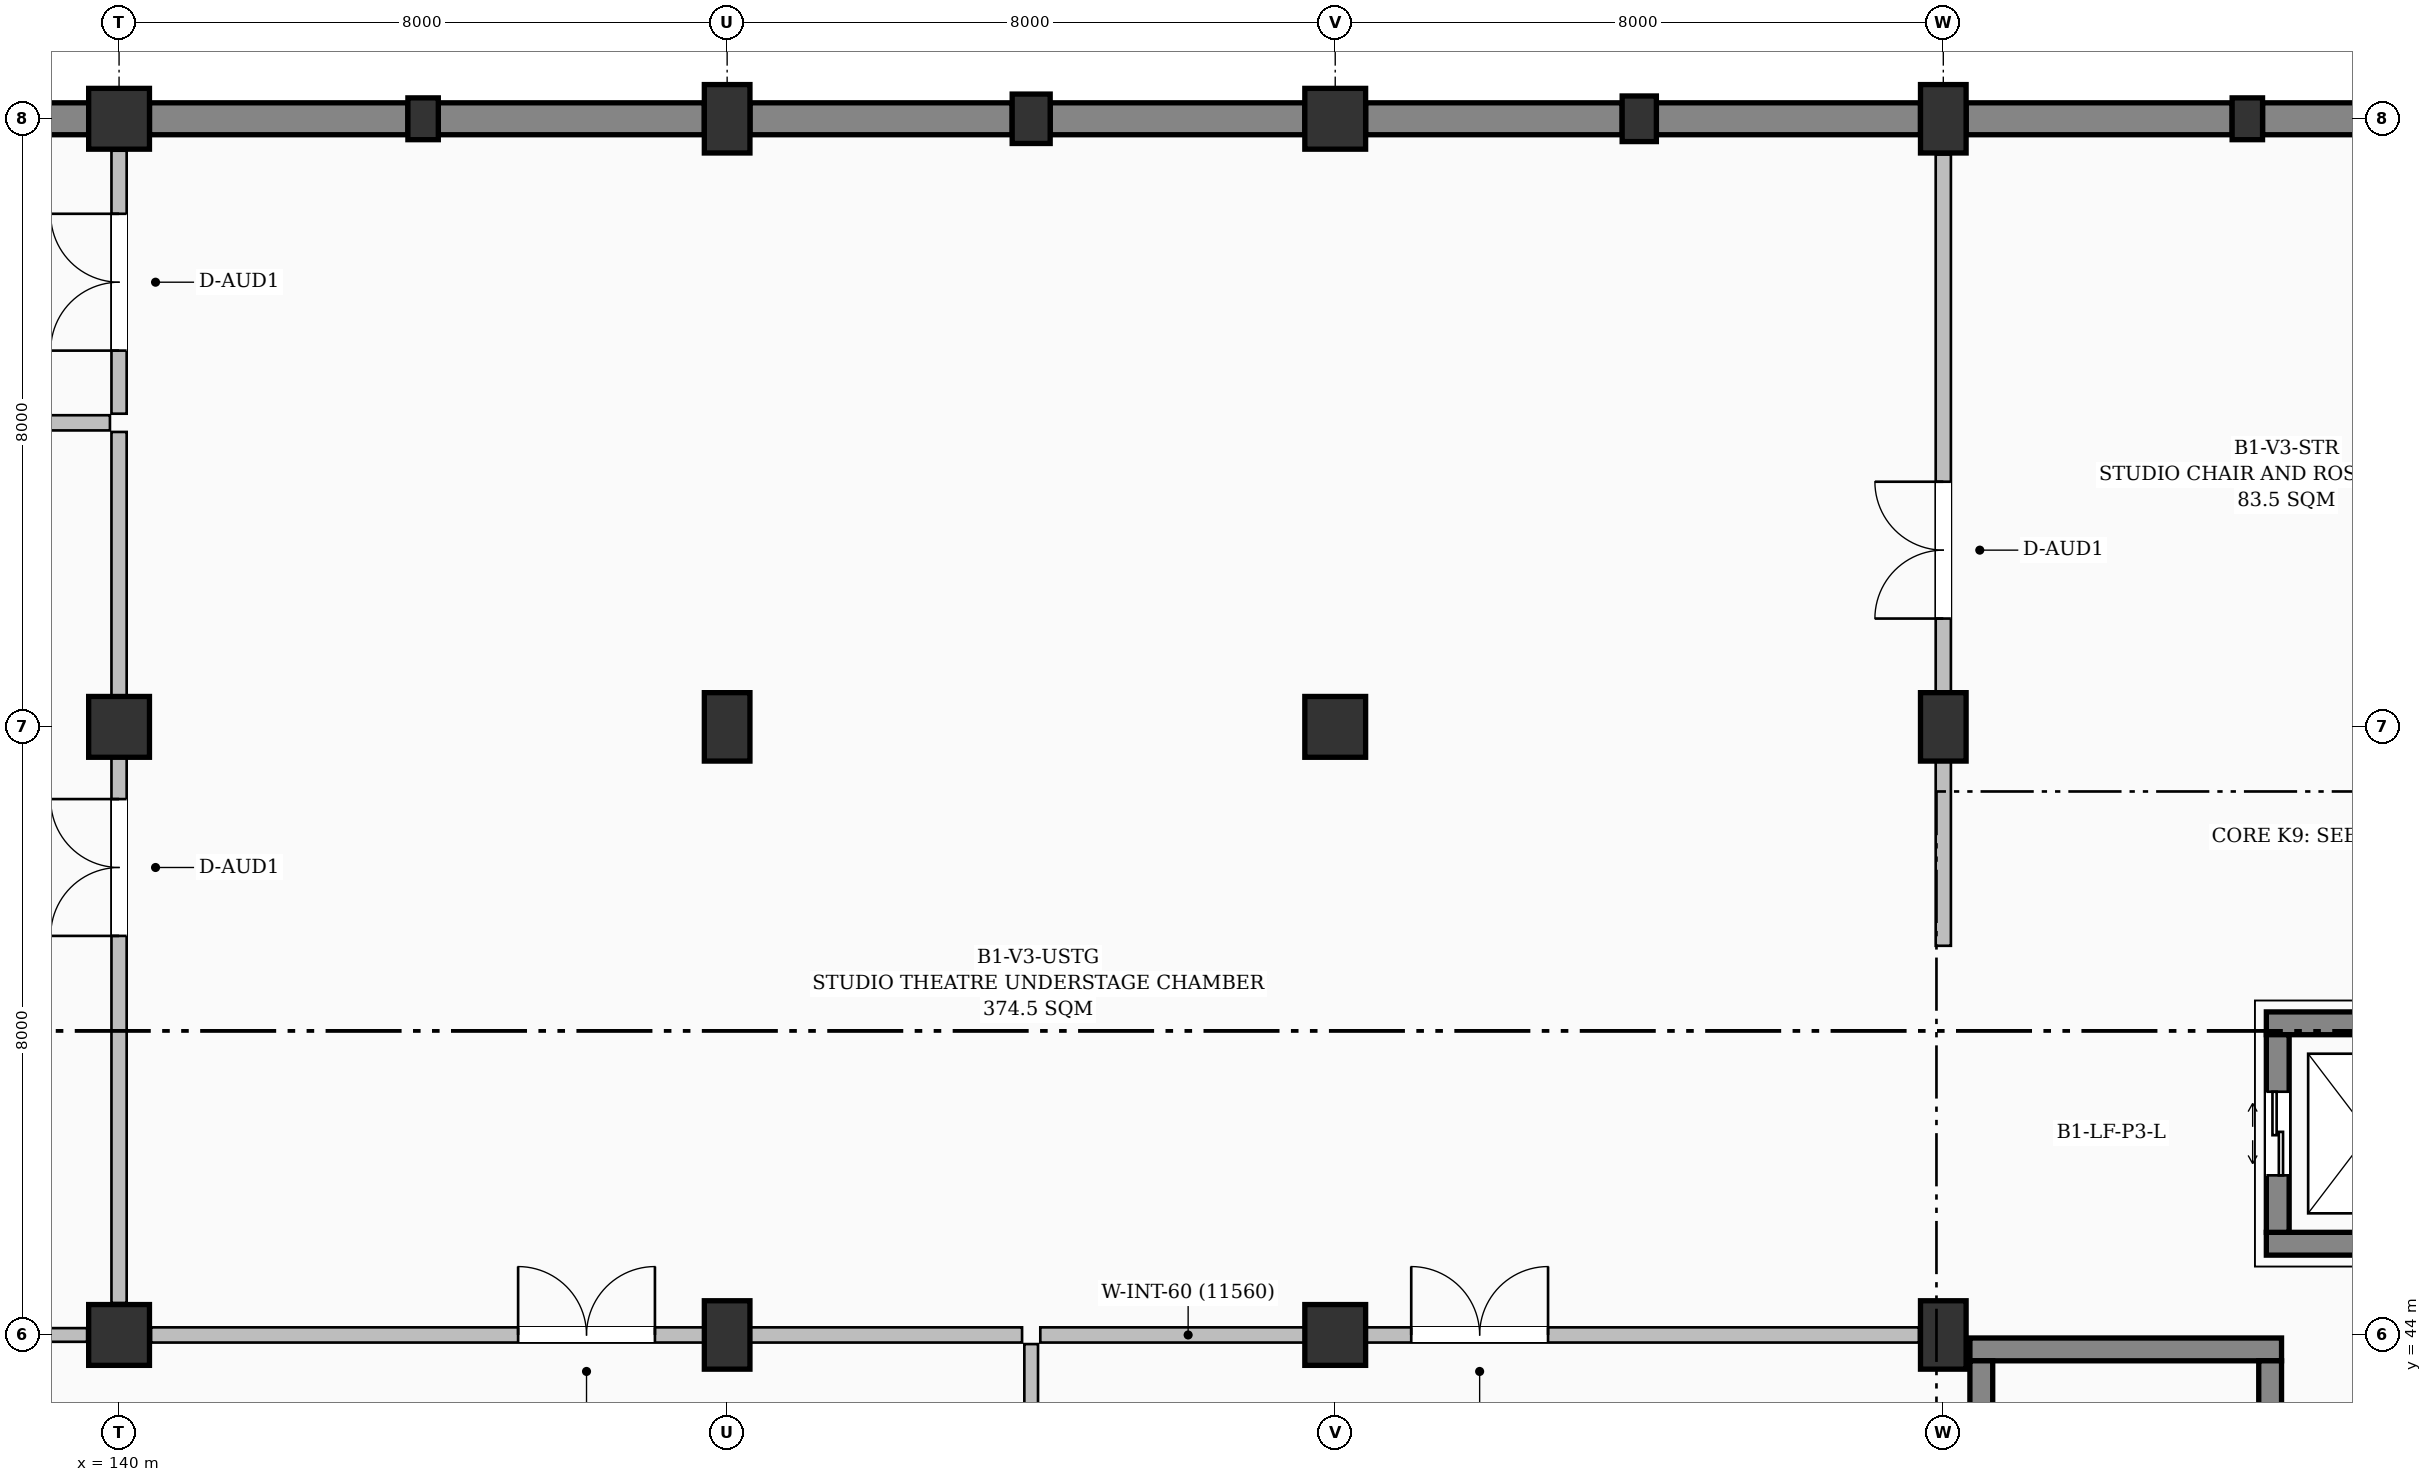
"""IFC4 building model, lengths in metres.
Left out: names, types, materials, properties, quantities, classifications, styles, units other than length and angle.
Written with IfcOpenShell. Run it as: python <this file> out.ifc"""

import sys

from ifc_helpers import new_model, si_unit, direction, frame, frame_2d, origin, origin_2d, place, context, subcontext, project, spatial, rectangle, extrude, element, fill, save


model = new_model("IFC4")
c1 = context("Model", 3, precision=1e-05, world=origin(), true_north=direction((0.0, 1.0)))
c2 = subcontext(c1, "Body", "Model", "MODEL_VIEW")
j1 = project(units=[si_unit("LENGTHUNIT", "METRE"), si_unit("PLANEANGLEUNIT", "RADIAN")], contexts=[c1])
p1 = place(None, origin())
s1 = spatial("IfcSite", under=j1, at=p1, CompositionType="ELEMENT")
p2 = place(p1, origin())
s2 = spatial("IfcBuilding", under=s1, at=p2, CompositionType="ELEMENT")
p3 = place(p2, frame((0.0, 0.0, -4.8)))
s3 = spatial("IfcBuildingStorey", under=s2, at=p3, CompositionType="ELEMENT", Elevation=-4.8)
for number, where, z_axis, x_axis in (
    (1, (140.0, 44.0, -0.38), (0.0, 0.0, 1.0), (1.0, 0.0, 0.0)),
    (2, (140.0, 52.0, -0.38), (0.0, 0.0, 1.0), (1.0, 0.0, 0.0)),
    (3, (140.0, 60.0, -0.38), (0.0, 0.0, 1.0), (1.0, 0.0, 0.0)),
):
    element("IfcColumn", number, at=place(p3, frame(where, z_axis=z_axis, x_axis=x_axis)), inside=s3, PredefinedType="COLUMN", context=c2, shape_type="SweptSolid", body=[
        extrude(rectangle(XDim=0.8, YDim=0.8, at=origin_2d()), origin(), (0.0, 0.0, 1.0), 5.18),
    ])
p4 = place(p3, frame((144.0, 60.0, -0.38), z_axis=(0.0, 0.0, 1.0), x_axis=(1.0, 0.0, 0.0)))
e4 = element("IfcColumn", 4, at=p4, inside=s3, PredefinedType="PILASTER", context=c2, shape_type="SweptSolid", body=[
    extrude(rectangle(XDim=0.4, YDim=0.55, at=origin_2d()), origin(), (0.0, 0.0, 1.0), 5.18),
])
for number, where, z_axis, x_axis in (
    (5, (148.0, 44.0, -0.38), (0.0, 0.0, 1.0), (1.0, 0.0, 0.0)),
    (6, (148.0, 52.0, -0.38), (0.0, 0.0, 1.0), (1.0, 0.0, 0.0)),
    (7, (148.0, 60.0, -0.38), (0.0, 0.0, 1.0), (1.0, 0.0, 0.0)),
):
    element("IfcColumn", number, at=place(p3, frame(where, z_axis=z_axis, x_axis=x_axis)), inside=s3, PredefinedType="COLUMN", context=c2, shape_type="SweptSolid", body=[
        extrude(rectangle(XDim=0.6, YDim=0.9, at=origin_2d()), origin(), (0.0, 0.0, 1.0), 5.18),
    ])
p5 = place(p3, frame((152.0, 60.0, -0.38), z_axis=(0.0, 0.0, 1.0), x_axis=(1.0, 0.0, 0.0)))
e8 = element("IfcColumn", 8, at=p5, inside=s3, PredefinedType="PILASTER", context=c2, shape_type="SweptSolid", body=[
    extrude(rectangle(XDim=0.5, YDim=0.65, at=origin_2d()), origin(), (0.0, 0.0, 1.0), 5.18),
])
for number, where, z_axis, x_axis in (
    (9, (156.0, 44.0, -0.38), (0.0, 0.0, 1.0), (1.0, 0.0, 0.0)),
    (10, (156.0, 52.0, -0.38), (0.0, 0.0, 1.0), (1.0, 0.0, 0.0)),
    (11, (156.0, 60.0, -0.38), (0.0, 0.0, 1.0), (1.0, 0.0, 0.0)),
):
    element("IfcColumn", number, at=place(p3, frame(where, z_axis=z_axis, x_axis=x_axis)), inside=s3, PredefinedType="COLUMN", context=c2, shape_type="SweptSolid", body=[
        extrude(rectangle(XDim=0.8, YDim=0.8, at=origin_2d()), origin(), (0.0, 0.0, 1.0), 5.18),
    ])
p6 = place(p3, frame((160.0, 60.0, -0.38), z_axis=(0.0, 0.0, 1.0), x_axis=(1.0, 0.0, 0.0)))
e12 = element("IfcColumn", 12, at=p6, inside=s3, PredefinedType="PILASTER", context=c2, shape_type="SweptSolid", body=[
    extrude(rectangle(XDim=0.45, YDim=0.6, at=origin_2d()), origin(), (0.0, 0.0, 1.0), 5.18),
])
for number, where, z_axis, x_axis in (
    (13, (164.0, 44.0, -0.38), (0.0, 0.0, 1.0), (1.0, 0.0, 0.0)),
    (14, (164.0, 52.0, -0.38), (0.0, 0.0, 1.0), (1.0, 0.0, 0.0)),
    (15, (164.0, 60.0, -0.38), (0.0, 0.0, 1.0), (1.0, 0.0, 0.0)),
):
    element("IfcColumn", number, at=place(p3, frame(where, z_axis=z_axis, x_axis=x_axis)), inside=s3, PredefinedType="COLUMN", context=c2, shape_type="SweptSolid", body=[
        extrude(rectangle(XDim=0.6, YDim=0.9, at=origin_2d()), origin(), (0.0, 0.0, 1.0), 5.18),
    ])
p7 = place(p3, frame((168.0, 60.0, -0.38), z_axis=(0.0, 0.0, 1.0), x_axis=(1.0, 0.0, 0.0)))
e16 = element("IfcColumn", 16, at=p7, inside=s3, PredefinedType="PILASTER", context=c2, shape_type="SweptSolid", body=[
    extrude(rectangle(XDim=0.4, YDim=0.55, at=origin_2d()), origin(), (0.0, 0.0, 1.0), 5.18),
])
p8 = place(p3, frame((136.225, 60.0, 0.0), z_axis=(0.0, 0.0, 1.0), x_axis=(1.0, 0.0, 0.0)))
e17 = element("IfcWall", 17, at=p8, inside=s3, PredefinedType="USERDEFINED", context=c2, shape_type="SweptSolid", body=[
    extrude(rectangle(XDim=3.375, YDim=0.42, at=frame_2d((1.688, 0.0))), origin(), (0.0, 0.0, 1.0), 3.85),
])
p9 = place(p3, frame((140.4, 60.0, 0.0), z_axis=(0.0, 0.0, 1.0), x_axis=(1.0, 0.0, 0.0)))
e18 = element("IfcWall", 18, at=p9, inside=s3, PredefinedType="USERDEFINED", context=c2, shape_type="SweptSolid", body=[
    extrude(rectangle(XDim=3.4, YDim=0.42, at=frame_2d((1.7, 0.0))), origin(), (0.0, 0.0, 1.0), 3.85),
])
p10 = place(p3, frame((144.2, 60.0, 0.0), z_axis=(0.0, 0.0, 1.0), x_axis=(1.0, 0.0, 0.0)))
e19 = element("IfcWall", 19, at=p10, inside=s3, PredefinedType="USERDEFINED", context=c2, shape_type="SweptSolid", body=[
    extrude(rectangle(XDim=3.5, YDim=0.42, at=frame_2d((1.75, 0.0))), origin(), (0.0, 0.0, 1.0), 3.85),
])
p11 = place(p3, frame((148.3, 60.0, 0.0), z_axis=(0.0, 0.0, 1.0), x_axis=(1.0, 0.0, 0.0)))
e20 = element("IfcWall", 20, at=p11, inside=s3, PredefinedType="USERDEFINED", context=c2, shape_type="SweptSolid", body=[
    extrude(rectangle(XDim=3.45, YDim=0.42, at=frame_2d((1.725, 0.0))), origin(), (0.0, 0.0, 1.0), 3.85),
])
p12 = place(p3, frame((152.25, 60.0, 0.0), z_axis=(0.0, 0.0, 1.0), x_axis=(1.0, 0.0, 0.0)))
e21 = element("IfcWall", 21, at=p12, inside=s3, PredefinedType="USERDEFINED", context=c2, shape_type="SweptSolid", body=[
    extrude(rectangle(XDim=3.35, YDim=0.42, at=frame_2d((1.675, 0.0))), origin(), (0.0, 0.0, 1.0), 3.85),
])
p13 = place(p3, frame((156.4, 60.0, 0.0), z_axis=(0.0, 0.0, 1.0), x_axis=(1.0, 0.0, 0.0)))
e22 = element("IfcWall", 22, at=p13, inside=s3, PredefinedType="USERDEFINED", context=c2, shape_type="SweptSolid", body=[
    extrude(rectangle(XDim=3.375, YDim=0.42, at=frame_2d((1.688, 0.0))), origin(), (0.0, 0.0, 1.0), 3.85),
])
p14 = place(p3, frame((160.225, 60.0, 0.0), z_axis=(0.0, 0.0, 1.0), x_axis=(1.0, 0.0, 0.0)))
e23 = element("IfcWall", 23, at=p14, inside=s3, PredefinedType="USERDEFINED", context=c2, shape_type="SweptSolid", body=[
    extrude(rectangle(XDim=3.475, YDim=0.42, at=frame_2d((1.737, 0.0))), origin(), (0.0, 0.0, 1.0), 3.85),
])
p15 = place(p3, frame((164.3, 60.0, 0.0), z_axis=(0.0, 0.0, 1.0), x_axis=(1.0, 0.0, 0.0)))
e24 = element("IfcWall", 24, at=p15, inside=s3, PredefinedType="USERDEFINED", context=c2, shape_type="SweptSolid", body=[
    extrude(rectangle(XDim=3.5, YDim=0.42, at=frame_2d((1.75, 0.0))), origin(), (0.0, 0.0, 1.0), 3.85),
])
p16 = place(p3, frame((168.2, 60.0, 0.0), z_axis=(0.0, 0.0, 1.0), x_axis=(1.0, 0.0, 0.0)))
e25 = element("IfcWall", 25, at=p16, inside=s3, PredefinedType="USERDEFINED", context=c2, shape_type="SweptSolid", body=[
    extrude(rectangle(XDim=3.45, YDim=0.42, at=frame_2d((1.725, 0.0))), origin(), (0.0, 0.0, 1.0), 3.85),
])
p17 = place(p3, frame((168.45, 43.81, -0.38), z_axis=(0.0, 0.0, 1.0), x_axis=(-1.0, 0.0, 0.0)))
e26 = element("IfcWall", 26, at=p17, inside=s3, PredefinedType="SHEAR", context=c2, shape_type="SweptSolid", body=[
    extrude(rectangle(XDim=4.1, YDim=0.3, at=frame_2d((2.05, 0.0))), origin(), (0.0, 0.0, 1.0), 4.88),
])
p18 = place(p3, frame((164.5, 43.66, -0.38), z_axis=(0.0, 0.0, 1.0), x_axis=(0.0, -1.0, 0.0)))
e27 = element("IfcWall", 27, at=p18, inside=s3, PredefinedType="SHEAR", context=c2, shape_type="SweptSolid", body=[
    extrude(rectangle(XDim=7.32, YDim=0.3, at=frame_2d((3.66, 0.0))), origin(), (0.0, 0.0, 1.0), 4.88),
])
p19 = place(p18, frame((5.77, 0.0, 0.38)))
e28 = element("IfcOpeningElement", 28, at=p19, cuts=e27, PredefinedType="OPENING", context=c2, shape_type="SweptSolid", body=[
    extrude(rectangle(XDim=1.2, YDim=2.15, at=frame_2d((0.6, 1.075))), frame((0.0, 0.16, 0.0), z_axis=(0.0, -1.0, 0.0), x_axis=(1.0, 0.0, 0.0)), (0.0, 0.0, 1.0), 0.32),
])
p20 = place(p3, frame((168.3, 43.66, -0.38), z_axis=(0.0, 0.0, 1.0), x_axis=(0.0, -1.0, 0.0)))
e29 = element("IfcWall", 29, at=p20, inside=s3, PredefinedType="SHEAR", context=c2, shape_type="SweptSolid", body=[
    extrude(rectangle(XDim=7.32, YDim=0.3, at=frame_2d((3.66, 0.0))), origin(), (0.0, 0.0, 1.0), 4.88),
])
for number, where, z_axis, x_axis in (
    (30, (168.25, 45.2, -1.2), (0.0, 0.0, 1.0), (1.0, 0.0, 0.0)),
    (31, (170.95, 48.1, -1.2), (0.0, 0.0, 1.0), (-1.0, 0.0, 0.0)),
):
    element("IfcWall", number, at=place(p3, frame(where, z_axis=z_axis, x_axis=x_axis)), inside=s3, PredefinedType="SHEAR", context=c2, shape_type="SweptSolid", body=[
        extrude(rectangle(XDim=2.7, YDim=0.3, at=frame_2d((1.35, 0.0))), origin(), (0.0, 0.0, 1.0), 5.7),
    ])
p21 = place(p3, frame((168.4, 45.35, -1.2), z_axis=(0.0, 0.0, 1.0), x_axis=(0.0, 1.0, 0.0)))
e32 = element("IfcWall", 32, at=p21, inside=s3, PredefinedType="SHEAR", context=c2, shape_type="SweptSolid", body=[
    extrude(rectangle(XDim=2.6, YDim=0.3, at=frame_2d((1.3, 0.0))), origin(), (0.0, 0.0, 1.0), 5.7),
])
p22 = place(p21, frame((0.75, 0.0, 1.2)))
e33 = element("IfcOpeningElement", 33, at=p22, cuts=e32, PredefinedType="OPENING", context=c2, shape_type="SweptSolid", body=[
    extrude(rectangle(XDim=1.1, YDim=2.15, at=frame_2d((0.55, 1.075))), frame((0.0, 0.16, 0.0), z_axis=(0.0, -1.0, 0.0), x_axis=(1.0, 0.0, 0.0)), (0.0, 0.0, 1.0), 0.32),
])
p23 = place(p3, frame((140.42, 44.0, 0.0), z_axis=(0.0, 0.0, 1.0), x_axis=(1.0, 0.0, 0.0)))
e34 = element("IfcWall", 34, at=p23, inside=s3, PredefinedType="PARTITIONING", context=c2, shape_type="SweptSolid", body=[
    extrude(rectangle(XDim=11.46, YDim=0.2, at=frame_2d((5.73, 0.0))), origin(), (0.0, 0.0, 1.0), 3.635),
])
p24 = place(p23, frame((4.83, 0.0, 0.0)))
e35 = element("IfcOpeningElement", 35, at=p24, cuts=e34, PredefinedType="OPENING", context=c2, shape_type="SweptSolid", body=[
    extrude(rectangle(XDim=1.8, YDim=2.35, at=frame_2d((0.9, 1.175))), frame((0.0, 0.11, 0.0), z_axis=(0.0, -1.0, 0.0), x_axis=(1.0, 0.0, 0.0)), (0.0, 0.0, 1.0), 0.22),
])
p25 = place(p3, frame((152.12, 44.0, 0.0), z_axis=(0.0, 0.0, 1.0), x_axis=(1.0, 0.0, 0.0)))
e36 = element("IfcWall", 36, at=p25, inside=s3, PredefinedType="PARTITIONING", context=c2, shape_type="SweptSolid", body=[
    extrude(rectangle(XDim=11.56, YDim=0.2, at=frame_2d((5.78, 0.0))), origin(), (0.0, 0.0, 1.0), 3.685),
])
p26 = place(p25, frame((4.88, 0.0, 0.0)))
e37 = element("IfcOpeningElement", 37, at=p26, cuts=e36, PredefinedType="OPENING", context=c2, shape_type="SweptSolid", body=[
    extrude(rectangle(XDim=1.8, YDim=2.35, at=frame_2d((0.9, 1.175))), frame((0.0, 0.11, 0.0), z_axis=(0.0, -1.0, 0.0), x_axis=(1.0, 0.0, 0.0)), (0.0, 0.0, 1.0), 0.22),
])
p27 = place(p3, frame((140.0, 44.42, 0.0), z_axis=(0.0, 0.0, 1.0), x_axis=(0.0, 1.0, 0.0)))
e38 = element("IfcWall", 38, at=p27, inside=s3, PredefinedType="PARTITIONING", context=c2, shape_type="SweptSolid", body=[
    extrude(rectangle(XDim=11.46, YDim=0.2, at=frame_2d((5.73, 0.0))), origin(), (0.0, 0.0, 1.0), 3.885),
])
p28 = place(p27, frame((4.83, 0.0, 0.0)))
e39 = element("IfcOpeningElement", 39, at=p28, cuts=e38, PredefinedType="OPENING", context=c2, shape_type="SweptSolid", body=[
    extrude(rectangle(XDim=1.8, YDim=2.35, at=frame_2d((0.9, 1.175))), frame((0.0, 0.11, 0.0), z_axis=(0.0, -1.0, 0.0), x_axis=(1.0, 0.0, 0.0)), (0.0, 0.0, 1.0), 0.22),
])
p29 = place(p3, frame((140.0, 56.12, 0.0), z_axis=(0.0, 0.0, 1.0), x_axis=(0.0, 1.0, 0.0)))
e40 = element("IfcWall", 40, at=p29, inside=s3, PredefinedType="PARTITIONING", context=c2, shape_type="SweptSolid", body=[
    extrude(rectangle(XDim=3.46, YDim=0.2, at=frame_2d((1.73, 0.0))), origin(), (0.0, 0.0, 1.0), 3.885),
])
p30 = place(p29, frame((0.83, 0.0, 0.0)))
e41 = element("IfcOpeningElement", 41, at=p30, cuts=e40, PredefinedType="OPENING", context=c2, shape_type="SweptSolid", body=[
    extrude(rectangle(XDim=1.8, YDim=2.35, at=frame_2d((0.9, 1.175))), frame((0.0, 0.11, 0.0), z_axis=(0.0, -1.0, 0.0), x_axis=(1.0, 0.0, 0.0)), (0.0, 0.0, 1.0), 0.22),
])
p31 = place(p3, frame((164.0, 49.12, 0.0), z_axis=(0.0, 0.0, 1.0), x_axis=(0.0, 1.0, 0.0)))
e42 = element("IfcWall", 42, at=p31, inside=s3, PredefinedType="PARTITIONING", context=c2, shape_type="SweptSolid", body=[
    extrude(rectangle(XDim=10.41, YDim=0.2, at=frame_2d((5.205, 0.0))), origin(), (0.0, 0.0, 1.0), 3.885),
])
p32 = place(p31, frame((4.305, 0.0, 0.0)))
e43 = element("IfcOpeningElement", 43, at=p32, cuts=e42, PredefinedType="OPENING", context=c2, shape_type="SweptSolid", body=[
    extrude(rectangle(XDim=1.8, YDim=2.35, at=frame_2d((0.9, 1.175))), frame((0.0, 0.11, 0.0), z_axis=(0.0, -1.0, 0.0), x_axis=(1.0, 0.0, 0.0)), (0.0, 0.0, 1.0), 0.22),
])
p33 = place(p3, frame((152.0, 36.345, 0.0), z_axis=(0.0, 0.0, 1.0), x_axis=(0.0, 1.0, 0.0)))
e44 = element("IfcWall", 44, at=p33, inside=s3, PredefinedType="PARTITIONING", context=c2, shape_type="SweptSolid", body=[
    extrude(rectangle(XDim=7.535, YDim=0.18, at=frame_2d((3.768, 0.0))), origin(), (0.0, 0.0, 1.0), 4.5),
])
p34 = place(p33, frame((3.093, 0.0, 0.0)))
e45 = element("IfcOpeningElement", 45, at=p34, cuts=e44, PredefinedType="OPENING", context=c2, shape_type="SweptSolid", body=[
    extrude(rectangle(XDim=1.35, YDim=2.2, at=frame_2d((0.675, 1.1))), frame((0.0, 0.1, 0.0), z_axis=(0.0, -1.0, 0.0), x_axis=(1.0, 0.0, 0.0)), (0.0, 0.0, 1.0), 0.2),
])
p35 = place(p3, frame((132.345, 44.0, 0.0), z_axis=(0.0, 0.0, 1.0), x_axis=(1.0, 0.0, 0.0)))
e46 = element("IfcWall", 46, at=p35, inside=s3, PredefinedType="PARTITIONING", context=c2, shape_type="SweptSolid", body=[
    extrude(rectangle(XDim=7.235, YDim=0.18, at=frame_2d((3.618, 0.0))), origin(), (0.0, 0.0, 1.0), 3.735),
])
p36 = place(p3, frame((136.12, 56.0, 0.0), z_axis=(0.0, 0.0, 1.0), x_axis=(1.0, 0.0, 0.0)))
e47 = element("IfcWall", 47, at=p36, inside=s3, PredefinedType="PARTITIONING", context=c2, shape_type="SweptSolid", body=[
    extrude(rectangle(XDim=3.76, YDim=0.2, at=frame_2d((1.88, 0.0))), origin(), (0.0, 0.0, 1.0), 4.5),
])
p37 = place(p22, origin())
e48 = element("IfcDoor", 48, at=p37, inside=s3, OperationType="DOUBLE_DOOR_SLIDING", PredefinedType="DOOR", context=c2, shape_type="SweptSolid", body=[
    extrude(rectangle(XDim=1.1, YDim=2.15, at=frame_2d((0.55, 1.075))), frame((0.0, 0.025, 0.0), z_axis=(0.0, -1.0, 0.0), x_axis=(1.0, 0.0, 0.0)), (0.0, 0.0, 1.0), 0.05),
])
fill(e33, e48)
p38 = place(p24, origin())
e49 = element("IfcDoor", 49, at=p38, inside=s3, OperationType="DOUBLE_DOOR_SINGLE_SWING", PredefinedType="DOOR", context=c2, shape_type="SweptSolid", body=[
    extrude(rectangle(XDim=1.8, YDim=2.35, at=frame_2d((0.9, 1.175))), frame((0.0, 0.025, 0.0), z_axis=(0.0, -1.0, 0.0), x_axis=(1.0, 0.0, 0.0)), (0.0, 0.0, 1.0), 0.05),
])
fill(e35, e49)
p39 = place(p26, origin())
e50 = element("IfcDoor", 50, at=p39, inside=s3, OperationType="DOUBLE_DOOR_SINGLE_SWING", PredefinedType="DOOR", context=c2, shape_type="SweptSolid", body=[
    extrude(rectangle(XDim=1.8, YDim=2.35, at=frame_2d((0.9, 1.175))), frame((0.0, 0.025, 0.0), z_axis=(0.0, -1.0, 0.0), x_axis=(1.0, 0.0, 0.0)), (0.0, 0.0, 1.0), 0.05),
])
fill(e37, e50)
p40 = place(p28, origin())
e51 = element("IfcDoor", 51, at=p40, inside=s3, OperationType="DOUBLE_DOOR_SINGLE_SWING", PredefinedType="DOOR", context=c2, shape_type="SweptSolid", body=[
    extrude(rectangle(XDim=1.8, YDim=2.35, at=frame_2d((0.9, 1.175))), frame((0.0, 0.025, 0.0), z_axis=(0.0, -1.0, 0.0), x_axis=(1.0, 0.0, 0.0)), (0.0, 0.0, 1.0), 0.05),
])
fill(e39, e51)
p41 = place(p30, origin())
e52 = element("IfcDoor", 52, at=p41, inside=s3, OperationType="DOUBLE_DOOR_SINGLE_SWING", PredefinedType="DOOR", context=c2, shape_type="SweptSolid", body=[
    extrude(rectangle(XDim=1.8, YDim=2.35, at=frame_2d((0.9, 1.175))), frame((0.0, 0.025, 0.0), z_axis=(0.0, -1.0, 0.0), x_axis=(1.0, 0.0, 0.0)), (0.0, 0.0, 1.0), 0.05),
])
fill(e41, e52)
p42 = place(p32, origin())
e53 = element("IfcDoor", 53, at=p42, inside=s3, OperationType="DOUBLE_DOOR_SINGLE_SWING", PredefinedType="DOOR", context=c2, shape_type="SweptSolid", body=[
    extrude(rectangle(XDim=1.8, YDim=2.35, at=frame_2d((0.9, 1.175))), frame((0.0, 0.025, 0.0), z_axis=(0.0, -1.0, 0.0), x_axis=(1.0, 0.0, 0.0)), (0.0, 0.0, 1.0), 0.05),
])
fill(e43, e53)
save(model, sys.argv[1])
